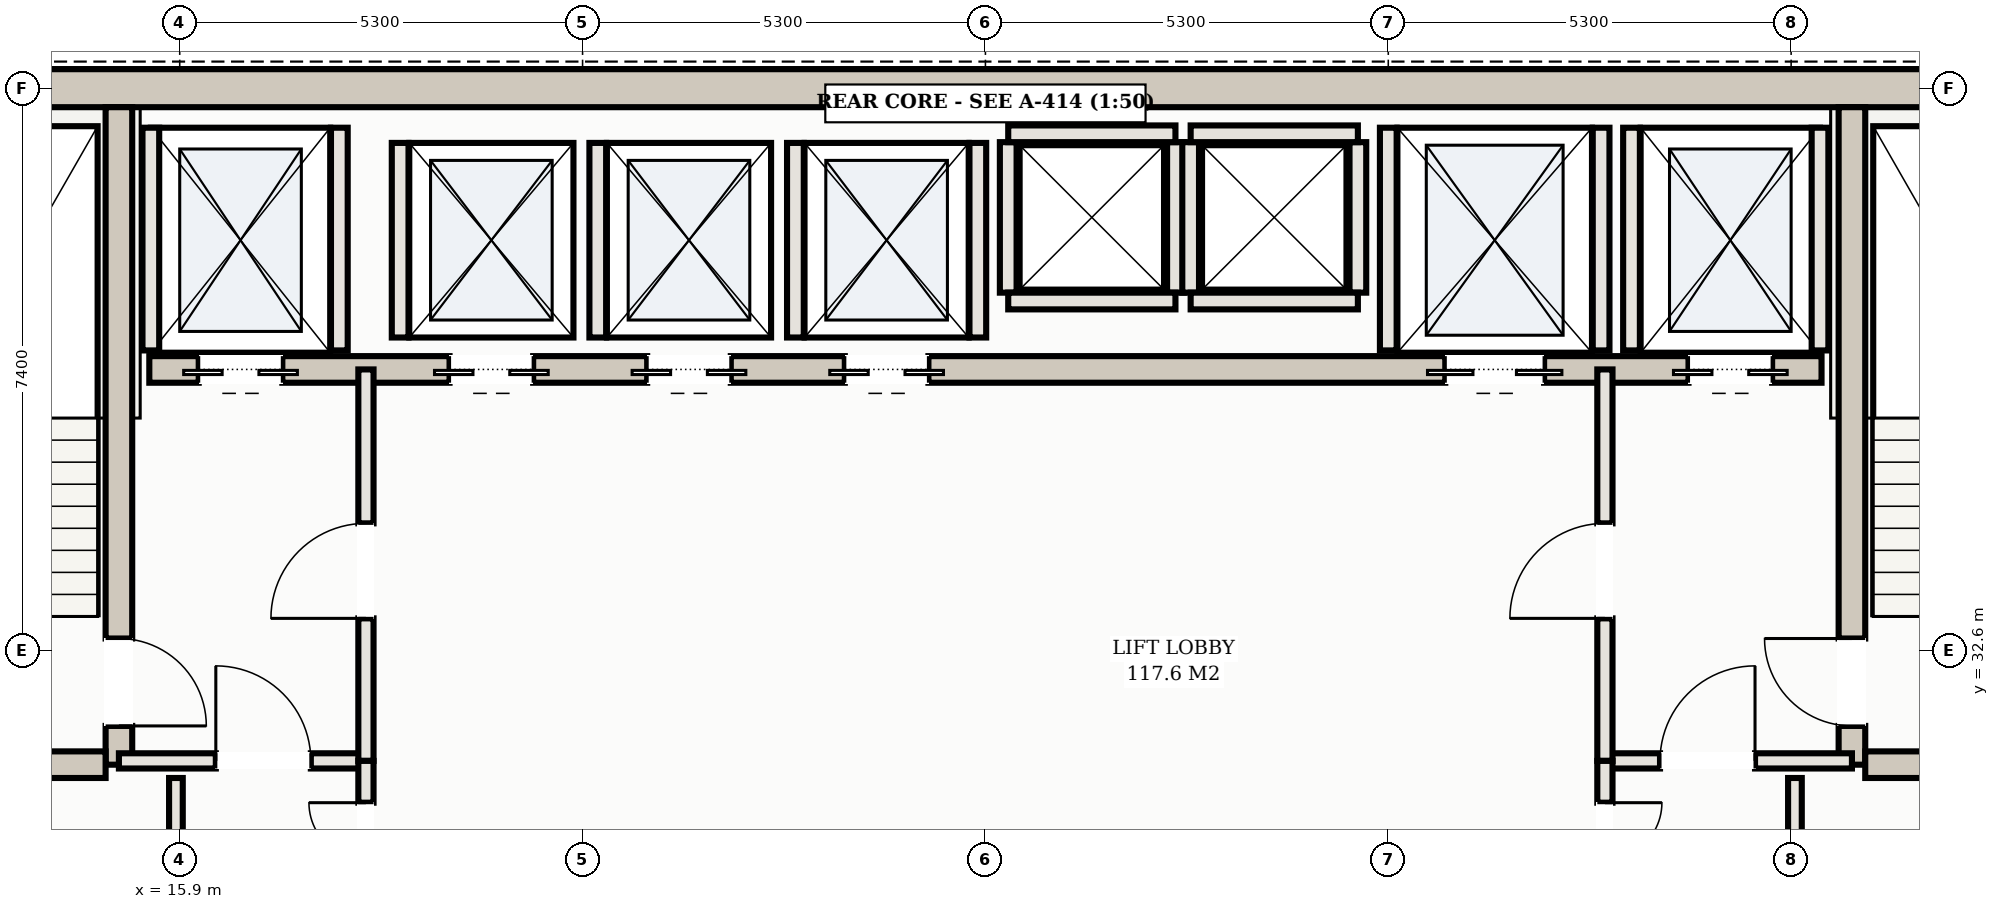
"""IFC4 building model, lengths in metres.
Left out: names, types, materials, properties, quantities, classifications, styles, units other than length and angle.
Written with IfcOpenShell. Run it as: python <this file> out.ifc"""

import sys

from ifc_helpers import new_model, si_unit, direction, frame, frame_2d, origin, place, context, subcontext, project, spatial, rectangle, extrude, element, fill, save


model = new_model("IFC4")
c1 = context("Model", 3, precision=1e-05, world=origin(), true_north=direction((0.0, 1.0)))
c2 = subcontext(c1, "Body", "Model", "MODEL_VIEW")
j1 = project(units=[si_unit("LENGTHUNIT", "METRE"), si_unit("PLANEANGLEUNIT", "RADIAN")], contexts=[c1])
p1 = place(None, origin())
s1 = spatial("IfcSite", under=j1, at=p1, CompositionType="ELEMENT")
p2 = place(p1, origin())
s2 = spatial("IfcBuilding", under=s1, at=p2, CompositionType="ELEMENT")
p3 = place(p2, frame((0.0, 0.0, 206.6)))
s3 = spatial("IfcBuildingStorey", under=s2, at=p3, CompositionType="ELEMENT", Elevation=206.6)
p4 = place(p3, frame((10.35, 40.0, 0.0), z_axis=(0.0, 0.0, 1.0), x_axis=(1.0, 0.0, 0.0)))
e1 = element("IfcWall", 1, at=p4, inside=s3, PredefinedType="SHEAR", context=c2, shape_type="SweptSolid", body=[
    extrude(rectangle(XDim=32.3, YDim=0.5, at=frame_2d((16.15, 0.0))), origin(), (0.0, 0.0, 1.0), 3.11),
])
p5 = place(p3, frame((15.1, 31.1, 0.0), z_axis=(0.0, 0.0, 1.0), x_axis=(0.0, 1.0, 0.0)))
e2 = element("IfcWall", 2, at=p5, inside=s3, PredefinedType="SHEAR", context=c2, shape_type="SweptSolid", body=[
    extrude(rectangle(XDim=8.65, YDim=0.35, at=frame_2d((4.325, 0.0))), origin(), (0.0, 0.0, 1.0), 3.11),
])
p6 = place(p5, frame((0.51, 0.0, 0.0)))
e3 = element("IfcOpeningElement", 3, at=p6, cuts=e2, PredefinedType="OPENING", context=c2, shape_type="SweptSolid", body=[
    extrude(rectangle(XDim=1.15, YDim=2.2, at=frame_2d((0.575, 1.1))), frame((0.0, 0.185, 0.0), z_axis=(0.0, -1.0, 0.0), x_axis=(1.0, 0.0, 0.0)), (0.0, 0.0, 1.0), 0.37),
])
p7 = place(p3, frame((10.85, 31.1, 0.0), z_axis=(0.0, 0.0, 1.0), x_axis=(1.0, 0.0, 0.0)))
e4 = element("IfcWall", 4, at=p7, inside=s3, PredefinedType="SHEAR", context=c2, shape_type="SweptSolid", body=[
    extrude(rectangle(XDim=4.075, YDim=0.35, at=frame_2d((2.038, 0.0))), origin(), (0.0, 0.0, 1.0), 3.11),
])
p8 = place(p3, frame((37.9, 31.1, 0.0), z_axis=(0.0, 0.0, 1.0), x_axis=(0.0, 1.0, 0.0)))
e5 = element("IfcWall", 5, at=p8, inside=s3, PredefinedType="SHEAR", context=c2, shape_type="SweptSolid", body=[
    extrude(rectangle(XDim=8.65, YDim=0.35, at=frame_2d((4.325, 0.0))), origin(), (0.0, 0.0, 1.0), 3.11),
])
p9 = place(p8, frame((0.51, 0.0, 0.0)))
e6 = element("IfcOpeningElement", 6, at=p9, cuts=e5, PredefinedType="OPENING", context=c2, shape_type="SweptSolid", body=[
    extrude(rectangle(XDim=1.15, YDim=2.2, at=frame_2d((0.575, 1.1))), frame((0.0, 0.185, 0.0), z_axis=(0.0, -1.0, 0.0), x_axis=(1.0, 0.0, 0.0)), (0.0, 0.0, 1.0), 0.37),
])
p10 = place(p3, frame((38.075, 31.1, 0.0), z_axis=(0.0, 0.0, 1.0), x_axis=(1.0, 0.0, 0.0)))
e7 = element("IfcWall", 7, at=p10, inside=s3, PredefinedType="SHEAR", context=c2, shape_type="SweptSolid", body=[
    extrude(rectangle(XDim=4.075, YDim=0.35, at=frame_2d((2.038, 0.0))), origin(), (0.0, 0.0, 1.0), 3.11),
])
p11 = place(p3, frame((15.5, 36.3, 0.0), z_axis=(0.0, 0.0, 1.0), x_axis=(1.0, 0.0, 0.0)))
e8 = element("IfcWall", 8, at=p11, inside=s3, PredefinedType="SHEAR", context=c2, shape_type="SweptSolid", body=[
    extrude(rectangle(XDim=22.0, YDim=0.35, at=frame_2d((11.0, 0.0))), origin(), (0.0, 0.0, 1.0), 3.11),
])
p12 = place(p11, frame((0.65, 0.0, 0.0)))
e9 = element("IfcOpeningElement", 9, at=p12, cuts=e8, PredefinedType="OPENING", context=c2, shape_type="SweptSolid", body=[
    extrude(rectangle(XDim=1.1, YDim=2.15, at=frame_2d((0.55, 1.075))), frame((0.0, 0.185, 0.0), z_axis=(0.0, -1.0, 0.0), x_axis=(1.0, 0.0, 0.0)), (0.0, 0.0, 1.0), 0.37),
])
p13 = place(p11, frame((20.25, 0.0, 0.0)))
e10 = element("IfcOpeningElement", 10, at=p13, cuts=e8, PredefinedType="OPENING", context=c2, shape_type="SweptSolid", body=[
    extrude(rectangle(XDim=1.1, YDim=2.15, at=frame_2d((0.55, 1.075))), frame((0.0, 0.185, 0.0), z_axis=(0.0, -1.0, 0.0), x_axis=(1.0, 0.0, 0.0)), (0.0, 0.0, 1.0), 0.37),
])
p14 = place(p11, frame((17.05, 0.0, 0.0)))
e11 = element("IfcOpeningElement", 11, at=p14, cuts=e8, PredefinedType="OPENING", context=c2, shape_type="SweptSolid", body=[
    extrude(rectangle(XDim=1.3, YDim=2.2, at=frame_2d((0.65, 1.1))), frame((0.0, 0.185, 0.0), z_axis=(0.0, -1.0, 0.0), x_axis=(1.0, 0.0, 0.0)), (0.0, 0.0, 1.0), 0.37),
])
p15 = place(p11, frame((3.95, 0.0, 0.0)))
e12 = element("IfcOpeningElement", 12, at=p15, cuts=e8, PredefinedType="OPENING", context=c2, shape_type="SweptSolid", body=[
    extrude(rectangle(XDim=1.1, YDim=2.15, at=frame_2d((0.55, 1.075))), frame((0.0, 0.185, 0.0), z_axis=(0.0, -1.0, 0.0), x_axis=(1.0, 0.0, 0.0)), (0.0, 0.0, 1.0), 0.37),
])
p16 = place(p11, frame((6.55, 0.0, 0.0)))
e13 = element("IfcOpeningElement", 13, at=p16, cuts=e8, PredefinedType="OPENING", context=c2, shape_type="SweptSolid", body=[
    extrude(rectangle(XDim=1.1, YDim=2.15, at=frame_2d((0.55, 1.075))), frame((0.0, 0.185, 0.0), z_axis=(0.0, -1.0, 0.0), x_axis=(1.0, 0.0, 0.0)), (0.0, 0.0, 1.0), 0.37),
])
p17 = place(p11, frame((9.15, 0.0, 0.0)))
e14 = element("IfcOpeningElement", 14, at=p17, cuts=e8, PredefinedType="OPENING", context=c2, shape_type="SweptSolid", body=[
    extrude(rectangle(XDim=1.1, YDim=2.15, at=frame_2d((0.55, 1.075))), frame((0.0, 0.185, 0.0), z_axis=(0.0, -1.0, 0.0), x_axis=(1.0, 0.0, 0.0)), (0.0, 0.0, 1.0), 0.37),
])
for number, where, z_axis, x_axis in (
    (15, (15.52, 36.55, 0.0), (0.0, 0.0, 1.0), (0.0, 1.0, 0.0)),
    (16, (18.0, 36.55, 0.0), (0.0, 0.0, 1.0), (0.0, 1.0, 0.0)),
    (17, (35.0, 36.55, 0.0), (0.0, 0.0, 1.0), (0.0, 1.0, 0.0)),
    (18, (37.48, 36.55, 0.0), (0.0, 0.0, 1.0), (0.0, 1.0, 0.0)),
    (19, (31.8, 36.55, 0.0), (0.0, 0.0, 1.0), (0.0, 1.0, 0.0)),
    (20, (34.6, 36.55, 0.0), (0.0, 0.0, 1.0), (0.0, 1.0, 0.0)),
):
    element("IfcWall", number, at=place(p3, frame(where, z_axis=z_axis, x_axis=x_axis)), inside=s3, PredefinedType="SOLIDWALL", context=c2, shape_type="SweptSolid", body=[
        extrude(rectangle(XDim=2.93, YDim=0.22, at=frame_2d((1.465, 0.0))), origin(), (0.0, 0.0, 1.0), 3.11),
    ])
for number, where, z_axis, x_axis in (
    (21, (18.8, 36.72, 0.0), (0.0, 0.0, 1.0), (0.0, 1.0, 0.0)),
    (22, (21.4, 36.72, 0.0), (0.0, 0.0, 1.0), (0.0, 1.0, 0.0)),
    (23, (24.0, 36.72, 0.0), (0.0, 0.0, 1.0), (0.0, 1.0, 0.0)),
    (24, (26.4, 36.72, 0.0), (0.0, 0.0, 1.0), (0.0, 1.0, 0.0)),
):
    element("IfcWall", number, at=place(p3, frame(where, z_axis=z_axis, x_axis=x_axis)), inside=s3, PredefinedType="SOLIDWALL", context=c2, shape_type="SweptSolid", body=[
        extrude(rectangle(XDim=2.56, YDim=0.22, at=frame_2d((1.28, 0.0))), origin(), (0.0, 0.0, 1.0), 3.11),
    ])
for number, where, z_axis, x_axis in (
    (25, (26.8, 37.31, 0.0), (0.0, 0.0, 1.0), (0.0, 1.0, 0.0)),
    (26, (29.0, 37.31, 0.0), (0.0, 0.0, 1.0), (0.0, 1.0, 0.0)),
):
    element("IfcWall", number, at=place(p3, frame(where, z_axis=z_axis, x_axis=x_axis)), inside=s3, PredefinedType="SOLIDWALL", context=c2, shape_type="SweptSolid", body=[
        extrude(rectangle(XDim=1.98, YDim=0.22, at=frame_2d((0.99, 0.0))), origin(), (0.0, 0.0, 1.0), 3.11),
    ])
for number, where, z_axis, x_axis in (
    (27, (26.8, 39.4, 0.0), (0.0, 0.0, 1.0), (1.0, 0.0, 0.0)),
    (28, (26.8, 37.2, 0.0), (0.0, 0.0, 1.0), (1.0, 0.0, 0.0)),
):
    element("IfcWall", number, at=place(p3, frame(where, z_axis=z_axis, x_axis=x_axis)), inside=s3, PredefinedType="SOLIDWALL", context=c2, shape_type="SweptSolid", body=[
        extrude(rectangle(XDim=2.2, YDim=0.22, at=frame_2d((1.1, 0.0))), origin(), (0.0, 0.0, 1.0), 3.11),
    ])
for number, where, z_axis, x_axis in (
    (29, (29.2, 37.31, 0.0), (0.0, 0.0, 1.0), (0.0, 1.0, 0.0)),
    (30, (31.4, 37.31, 0.0), (0.0, 0.0, 1.0), (0.0, 1.0, 0.0)),
):
    element("IfcWall", number, at=place(p3, frame(where, z_axis=z_axis, x_axis=x_axis)), inside=s3, PredefinedType="SOLIDWALL", context=c2, shape_type="SweptSolid", body=[
        extrude(rectangle(XDim=1.98, YDim=0.22, at=frame_2d((0.99, 0.0))), origin(), (0.0, 0.0, 1.0), 3.11),
    ])
for number, where, z_axis, x_axis in (
    (31, (29.2, 39.4, 0.0), (0.0, 0.0, 1.0), (1.0, 0.0, 0.0)),
    (32, (29.2, 37.2, 0.0), (0.0, 0.0, 1.0), (1.0, 0.0, 0.0)),
):
    element("IfcWall", number, at=place(p3, frame(where, z_axis=z_axis, x_axis=x_axis)), inside=s3, PredefinedType="SOLIDWALL", context=c2, shape_type="SweptSolid", body=[
        extrude(rectangle(XDim=2.2, YDim=0.22, at=frame_2d((1.1, 0.0))), origin(), (0.0, 0.0, 1.0), 3.11),
    ])
p18 = place(p3, frame((15.1, 31.15, 0.0), z_axis=(0.0, 0.0, 1.0), x_axis=(1.0, 0.0, 0.0)))
e33 = element("IfcWall", 33, at=p18, inside=s3, PredefinedType="PARTITIONING", context=c2, shape_type="SweptSolid", body=[
    extrude(rectangle(XDim=3.25, YDim=0.2, at=frame_2d((1.625, 0.0))), origin(), (0.0, 0.0, 1.0), 2.43),
])
p19 = place(p18, frame((1.275, 0.0, 0.0)))
e34 = element("IfcOpeningElement", 34, at=p19, cuts=e33, PredefinedType="OPENING", context=c2, shape_type="SweptSolid", body=[
    extrude(rectangle(XDim=1.25, YDim=2.2, at=frame_2d((0.625, 1.1))), frame((0.0, 0.11, 0.0), z_axis=(0.0, -1.0, 0.0), x_axis=(1.0, 0.0, 0.0)), (0.0, 0.0, 1.0), 0.22),
])
p20 = place(p3, frame((18.35, 31.15, 0.0), z_axis=(0.0, 0.0, 1.0), x_axis=(0.0, 1.0, 0.0)))
e35 = element("IfcWall", 35, at=p20, inside=s3, PredefinedType="PARTITIONING", context=c2, shape_type="SweptSolid", body=[
    extrude(rectangle(XDim=5.15, YDim=0.2, at=frame_2d((2.575, 0.0))), origin(), (0.0, 0.0, 1.0), 2.43),
])
p21 = place(p20, frame((1.875, 0.0, 0.0)))
e36 = element("IfcOpeningElement", 36, at=p21, cuts=e35, PredefinedType="OPENING", context=c2, shape_type="SweptSolid", body=[
    extrude(rectangle(XDim=1.25, YDim=2.2, at=frame_2d((0.625, 1.1))), frame((0.0, 0.11, 0.0), z_axis=(0.0, -1.0, 0.0), x_axis=(1.0, 0.0, 0.0)), (0.0, 0.0, 1.0), 0.22),
])
p22 = place(p3, frame((34.65, 31.15, 0.0), z_axis=(0.0, 0.0, 1.0), x_axis=(1.0, 0.0, 0.0)))
e37 = element("IfcWall", 37, at=p22, inside=s3, PredefinedType="PARTITIONING", context=c2, shape_type="SweptSolid", body=[
    extrude(rectangle(XDim=3.25, YDim=0.2, at=frame_2d((1.625, 0.0))), origin(), (0.0, 0.0, 1.0), 2.43),
])
p23 = place(p22, frame((0.725, 0.0, 0.0)))
e38 = element("IfcOpeningElement", 38, at=p23, cuts=e37, PredefinedType="OPENING", context=c2, shape_type="SweptSolid", body=[
    extrude(rectangle(XDim=1.25, YDim=2.2, at=frame_2d((0.625, 1.1))), frame((0.0, 0.11, 0.0), z_axis=(0.0, -1.0, 0.0), x_axis=(1.0, 0.0, 0.0)), (0.0, 0.0, 1.0), 0.22),
])
p24 = place(p3, frame((34.65, 31.15, 0.0), z_axis=(0.0, 0.0, 1.0), x_axis=(0.0, 1.0, 0.0)))
e39 = element("IfcWall", 39, at=p24, inside=s3, PredefinedType="PARTITIONING", context=c2, shape_type="SweptSolid", body=[
    extrude(rectangle(XDim=5.15, YDim=0.2, at=frame_2d((2.575, 0.0))), origin(), (0.0, 0.0, 1.0), 2.43),
])
p25 = place(p24, frame((1.875, 0.0, 0.0)))
e40 = element("IfcOpeningElement", 40, at=p25, cuts=e39, PredefinedType="OPENING", context=c2, shape_type="SweptSolid", body=[
    extrude(rectangle(XDim=1.25, YDim=2.2, at=frame_2d((0.625, 1.1))), frame((0.0, 0.11, 0.0), z_axis=(0.0, -1.0, 0.0), x_axis=(1.0, 0.0, 0.0)), (0.0, 0.0, 1.0), 0.22),
])
p26 = place(p3, frame((15.85, 25.45, 0.0), z_axis=(0.0, 0.0, 1.0), x_axis=(0.0, 1.0, 0.0)))
e41 = element("IfcWall", 41, at=p26, inside=s3, PredefinedType="PARTITIONING", context=c2, shape_type="SweptSolid", body=[
    extrude(rectangle(XDim=5.475, YDim=0.18, at=frame_2d((2.738, 0.0))), origin(), (0.0, 0.0, 1.0), 2.43),
])
p27 = place(p26, frame((2.277, 0.0, 0.0)))
e42 = element("IfcOpeningElement", 42, at=p27, cuts=e41, PredefinedType="OPENING", context=c2, shape_type="SweptSolid", body=[
    extrude(rectangle(XDim=0.92, YDim=2.15, at=frame_2d((0.46, 1.075))), frame((0.0, 0.1, 0.0), z_axis=(0.0, -1.0, 0.0), x_axis=(1.0, 0.0, 0.0)), (0.0, 0.0, 1.0), 0.2),
])
p28 = place(p3, frame((37.15, 25.45, 0.0), z_axis=(0.0, 0.0, 1.0), x_axis=(0.0, 1.0, 0.0)))
e43 = element("IfcWall", 43, at=p28, inside=s3, PredefinedType="PARTITIONING", context=c2, shape_type="SweptSolid", body=[
    extrude(rectangle(XDim=5.475, YDim=0.18, at=frame_2d((2.738, 0.0))), origin(), (0.0, 0.0, 1.0), 2.43),
])
p29 = place(p28, frame((2.277, 0.0, 0.0)))
e44 = element("IfcOpeningElement", 44, at=p29, cuts=e43, PredefinedType="OPENING", context=c2, shape_type="SweptSolid", body=[
    extrude(rectangle(XDim=0.92, YDim=2.15, at=frame_2d((0.46, 1.075))), frame((0.0, 0.1, 0.0), z_axis=(0.0, -1.0, 0.0), x_axis=(1.0, 0.0, 0.0)), (0.0, 0.0, 1.0), 0.2),
])
p30 = place(p3, frame((18.35, 28.55, 0.0), z_axis=(0.0, 0.0, 1.0), x_axis=(0.0, 1.0, 0.0)))
e45 = element("IfcWall", 45, at=p30, inside=s3, PredefinedType="PARTITIONING", context=c2, shape_type="SweptSolid", body=[
    extrude(rectangle(XDim=2.6, YDim=0.2, at=frame_2d((1.3, 0.0))), origin(), (0.0, 0.0, 1.0), 2.43),
])
p31 = place(p30, frame((0.55, 0.0, 0.0)))
e46 = element("IfcOpeningElement", 46, at=p31, cuts=e45, PredefinedType="OPENING", context=c2, shape_type="SweptSolid", body=[
    extrude(rectangle(XDim=1.5, YDim=2.25, at=frame_2d((0.75, 1.125))), frame((0.0, 0.11, 0.0), z_axis=(0.0, -1.0, 0.0), x_axis=(1.0, 0.0, 0.0)), (0.0, 0.0, 1.0), 0.22),
])
p32 = place(p3, frame((34.65, 28.55, 0.0), z_axis=(0.0, 0.0, 1.0), x_axis=(0.0, 1.0, 0.0)))
e47 = element("IfcWall", 47, at=p32, inside=s3, PredefinedType="PARTITIONING", context=c2, shape_type="SweptSolid", body=[
    extrude(rectangle(XDim=2.6, YDim=0.2, at=frame_2d((1.3, 0.0))), origin(), (0.0, 0.0, 1.0), 2.43),
])
p33 = place(p32, frame((0.55, 0.0, 0.0)))
e48 = element("IfcOpeningElement", 48, at=p33, cuts=e47, PredefinedType="OPENING", context=c2, shape_type="SweptSolid", body=[
    extrude(rectangle(XDim=1.5, YDim=2.25, at=frame_2d((0.75, 1.125))), frame((0.0, 0.11, 0.0), z_axis=(0.0, -1.0, 0.0), x_axis=(1.0, 0.0, 0.0)), (0.0, 0.0, 1.0), 0.22),
])
p34 = place(p12, frame((1.1, 0.0, 0.0), z_axis=(0.0, 0.0, 1.0), x_axis=(-1.0, 0.0, 0.0)))
e49 = element("IfcDoor", 49, at=p34, inside=s3, OperationType="DOUBLE_DOOR_SLIDING", PredefinedType="DOOR", context=c2, shape_type="SweptSolid", body=[
    extrude(rectangle(XDim=1.1, YDim=2.15, at=frame_2d((0.55, 1.075))), frame((0.0, 0.025, 0.0), z_axis=(0.0, -1.0, 0.0), x_axis=(1.0, 0.0, 0.0)), (0.0, 0.0, 1.0), 0.05),
])
fill(e9, e49)
p35 = place(p13, frame((1.1, 0.0, 0.0), z_axis=(0.0, 0.0, 1.0), x_axis=(-1.0, 0.0, 0.0)))
e50 = element("IfcDoor", 50, at=p35, inside=s3, OperationType="DOUBLE_DOOR_SLIDING", PredefinedType="DOOR", context=c2, shape_type="SweptSolid", body=[
    extrude(rectangle(XDim=1.1, YDim=2.15, at=frame_2d((0.55, 1.075))), frame((0.0, 0.025, 0.0), z_axis=(0.0, -1.0, 0.0), x_axis=(1.0, 0.0, 0.0)), (0.0, 0.0, 1.0), 0.05),
])
fill(e10, e50)
p36 = place(p14, frame((1.3, 0.0, 0.0), z_axis=(0.0, 0.0, 1.0), x_axis=(-1.0, 0.0, 0.0)))
e51 = element("IfcDoor", 51, at=p36, inside=s3, OperationType="DOUBLE_DOOR_SLIDING", PredefinedType="DOOR", context=c2, shape_type="SweptSolid", body=[
    extrude(rectangle(XDim=1.3, YDim=2.2, at=frame_2d((0.65, 1.1))), frame((0.0, 0.025, 0.0), z_axis=(0.0, -1.0, 0.0), x_axis=(1.0, 0.0, 0.0)), (0.0, 0.0, 1.0), 0.05),
])
fill(e11, e51)
p37 = place(p15, frame((1.1, 0.0, 0.0), z_axis=(0.0, 0.0, 1.0), x_axis=(-1.0, 0.0, 0.0)))
e52 = element("IfcDoor", 52, at=p37, inside=s3, OperationType="DOUBLE_DOOR_SLIDING", PredefinedType="DOOR", context=c2, shape_type="SweptSolid", body=[
    extrude(rectangle(XDim=1.1, YDim=2.15, at=frame_2d((0.55, 1.075))), frame((0.0, 0.025, 0.0), z_axis=(0.0, -1.0, 0.0), x_axis=(1.0, 0.0, 0.0)), (0.0, 0.0, 1.0), 0.05),
])
fill(e12, e52)
p38 = place(p16, frame((1.1, 0.0, 0.0), z_axis=(0.0, 0.0, 1.0), x_axis=(-1.0, 0.0, 0.0)))
e53 = element("IfcDoor", 53, at=p38, inside=s3, OperationType="DOUBLE_DOOR_SLIDING", PredefinedType="DOOR", context=c2, shape_type="SweptSolid", body=[
    extrude(rectangle(XDim=1.1, YDim=2.15, at=frame_2d((0.55, 1.075))), frame((0.0, 0.025, 0.0), z_axis=(0.0, -1.0, 0.0), x_axis=(1.0, 0.0, 0.0)), (0.0, 0.0, 1.0), 0.05),
])
fill(e13, e53)
p39 = place(p17, frame((1.1, 0.0, 0.0), z_axis=(0.0, 0.0, 1.0), x_axis=(-1.0, 0.0, 0.0)))
e54 = element("IfcDoor", 54, at=p39, inside=s3, OperationType="DOUBLE_DOOR_SLIDING", PredefinedType="DOOR", context=c2, shape_type="SweptSolid", body=[
    extrude(rectangle(XDim=1.1, YDim=2.15, at=frame_2d((0.55, 1.075))), frame((0.0, 0.025, 0.0), z_axis=(0.0, -1.0, 0.0), x_axis=(1.0, 0.0, 0.0)), (0.0, 0.0, 1.0), 0.05),
])
fill(e14, e54)
p40 = place(p19, origin())
e55 = element("IfcDoor", 55, at=p40, inside=s3, OperationType="SINGLE_SWING_LEFT", PredefinedType="DOOR", context=c2, shape_type="SweptSolid", body=[
    extrude(rectangle(XDim=1.25, YDim=2.2, at=frame_2d((0.625, 1.1))), frame((0.0, 0.025, 0.0), z_axis=(0.0, -1.0, 0.0), x_axis=(1.0, 0.0, 0.0)), (0.0, 0.0, 1.0), 0.05),
])
fill(e34, e55)
p41 = place(p21, origin())
e56 = element("IfcDoor", 56, at=p41, inside=s3, OperationType="SINGLE_SWING_LEFT", PredefinedType="DOOR", context=c2, shape_type="SweptSolid", body=[
    extrude(rectangle(XDim=1.25, YDim=2.2, at=frame_2d((0.625, 1.1))), frame((0.0, 0.025, 0.0), z_axis=(0.0, -1.0, 0.0), x_axis=(1.0, 0.0, 0.0)), (0.0, 0.0, 1.0), 0.05),
])
fill(e36, e56)
p42 = place(p23, origin())
e57 = element("IfcDoor", 57, at=p42, inside=s3, OperationType="SINGLE_SWING_RIGHT", PredefinedType="DOOR", context=c2, shape_type="SweptSolid", body=[
    extrude(rectangle(XDim=1.25, YDim=2.2, at=frame_2d((0.625, 1.1))), frame((0.0, 0.025, 0.0), z_axis=(0.0, -1.0, 0.0), x_axis=(1.0, 0.0, 0.0)), (0.0, 0.0, 1.0), 0.05),
])
fill(e38, e57)
p43 = place(p25, origin())
e58 = element("IfcDoor", 58, at=p43, inside=s3, OperationType="SINGLE_SWING_LEFT", PredefinedType="DOOR", context=c2, shape_type="SweptSolid", body=[
    extrude(rectangle(XDim=1.25, YDim=2.2, at=frame_2d((0.625, 1.1))), frame((0.0, 0.025, 0.0), z_axis=(0.0, -1.0, 0.0), x_axis=(1.0, 0.0, 0.0)), (0.0, 0.0, 1.0), 0.05),
])
fill(e40, e58)
p44 = place(p6, frame((1.15, 0.0, 0.0), z_axis=(0.0, 0.0, 1.0), x_axis=(-1.0, 0.0, 0.0)))
e59 = element("IfcDoor", 59, at=p44, inside=s3, OperationType="SINGLE_SWING_RIGHT", PredefinedType="DOOR", context=c2, shape_type="SweptSolid", body=[
    extrude(rectangle(XDim=1.15, YDim=2.2, at=frame_2d((0.575, 1.1))), frame((0.0, 0.025, 0.0), z_axis=(0.0, -1.0, 0.0), x_axis=(1.0, 0.0, 0.0)), (0.0, 0.0, 1.0), 0.05),
])
fill(e3, e59)
p45 = place(p9, origin())
e60 = element("IfcDoor", 60, at=p45, inside=s3, OperationType="SINGLE_SWING_RIGHT", PredefinedType="DOOR", context=c2, shape_type="SweptSolid", body=[
    extrude(rectangle(XDim=1.15, YDim=2.2, at=frame_2d((0.575, 1.1))), frame((0.0, 0.025, 0.0), z_axis=(0.0, -1.0, 0.0), x_axis=(1.0, 0.0, 0.0)), (0.0, 0.0, 1.0), 0.05),
])
fill(e6, e60)
p46 = place(p31, origin())
e61 = element("IfcDoor", 61, at=p46, inside=s3, OperationType="DOUBLE_DOOR_SINGLE_SWING", PredefinedType="DOOR", context=c2, shape_type="SweptSolid", body=[
    extrude(rectangle(XDim=1.5, YDim=2.25, at=frame_2d((0.75, 1.125))), frame((0.0, 0.025, 0.0), z_axis=(0.0, -1.0, 0.0), x_axis=(1.0, 0.0, 0.0)), (0.0, 0.0, 1.0), 0.05),
])
fill(e46, e61)
p47 = place(p33, frame((1.5, 0.0, 0.0), z_axis=(0.0, 0.0, 1.0), x_axis=(-1.0, 0.0, 0.0)))
e62 = element("IfcDoor", 62, at=p47, inside=s3, OperationType="DOUBLE_DOOR_SINGLE_SWING", PredefinedType="DOOR", context=c2, shape_type="SweptSolid", body=[
    extrude(rectangle(XDim=1.5, YDim=2.25, at=frame_2d((0.75, 1.125))), frame((0.0, 0.025, 0.0), z_axis=(0.0, -1.0, 0.0), x_axis=(1.0, 0.0, 0.0)), (0.0, 0.0, 1.0), 0.05),
])
fill(e48, e62)
save(model, sys.argv[1])
